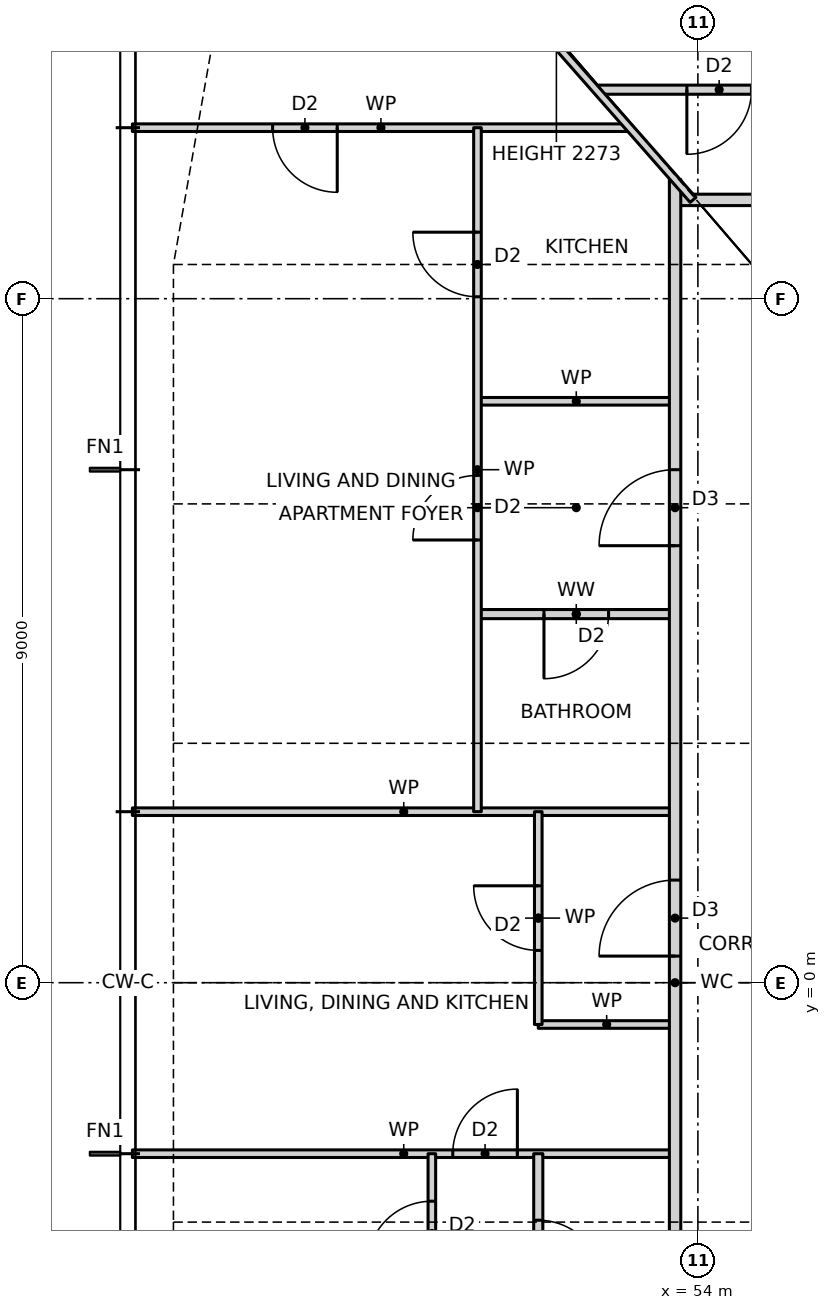
"""IFC4 building model, lengths in metres.
Left out: names, types, materials, properties, quantities, classifications, styles, units other than length and angle.
Written with IfcOpenShell. Run it as: python <this file> out.ifc"""

import sys

from ifc_helpers import new_model, si_unit, direction, frame, frame_2d, origin, place, context, subcontext, project, spatial, rectangle, extrude, element, fill, save


model = new_model("IFC4")
c1 = context("Model", 3, precision=1e-05, world=origin(), true_north=direction((0.0, 1.0)))
c2 = subcontext(c1, "Body", "Model", "MODEL_VIEW")
j1 = project(units=[si_unit("LENGTHUNIT", "METRE"), si_unit("PLANEANGLEUNIT", "RADIAN")], contexts=[c1])
p1 = place(None, origin())
s1 = spatial("IfcSite", under=j1, at=p1, CompositionType="ELEMENT")
p2 = place(p1, origin())
s2 = spatial("IfcBuilding", under=s1, at=p2, CompositionType="ELEMENT")
p3 = place(p2, frame((0.0, 0.0, 71.0)))
s3 = spatial("IfcBuildingStorey", under=s2, at=p3, CompositionType="ELEMENT", Elevation=71.0)
p4 = place(p3, frame((46.56, -2.25, 0.0), z_axis=(0.0, 0.0, 1.0), x_axis=(1.0, 0.0, 0.0)))
e1 = element("IfcWall", 1, at=p4, inside=s3, PredefinedType="PARTITIONING", context=c2, shape_type="SweptSolid", body=[
    extrude(rectangle(XDim=7.14, YDim=0.1, at=frame_2d((3.57, 0.0))), origin(), (0.0, 0.0, 1.0), 3.2),
])
p5 = place(p4, frame((4.215, 0.0, 0.0)))
e2 = element("IfcOpeningElement", 2, at=p5, cuts=e1, PredefinedType="OPENING", context=c2, shape_type="SweptSolid", body=[
    extrude(rectangle(XDim=0.85, YDim=2.1, at=frame_2d((0.425, 1.05))), frame((0.0, 0.06, 0.0), z_axis=(0.0, -1.0, 0.0), x_axis=(1.0, 0.0, 0.0)), (0.0, 0.0, 1.0), 0.12),
])
p6 = place(p3, frame((51.9, -0.55, 0.0), z_axis=(0.0, 0.0, 1.0), x_axis=(1.0, 0.0, 0.0)))
e3 = element("IfcWall", 3, at=p6, inside=s3, PredefinedType="PARTITIONING", context=c2, shape_type="SweptSolid", body=[
    extrude(rectangle(XDim=1.8, YDim=0.1, at=frame_2d((0.9, 0.0))), origin(), (0.0, 0.0, 1.0), 3.2),
])
p7 = place(p3, frame((46.56, 2.25, 0.0), z_axis=(0.0, 0.0, 1.0), x_axis=(1.0, 0.0, 0.0)))
e4 = element("IfcWall", 4, at=p7, inside=s3, PredefinedType="PARTITIONING", context=c2, shape_type="SweptSolid", body=[
    extrude(rectangle(XDim=7.14, YDim=0.1, at=frame_2d((3.57, 0.0))), origin(), (0.0, 0.0, 1.0), 3.2),
])
p8 = place(p3, frame((51.1, 4.85, 0.0), z_axis=(0.0, 0.0, 1.0), x_axis=(1.0, 0.0, 0.0)))
e5 = element("IfcWall", 5, at=p8, inside=s3, PredefinedType="PARTITIONING", context=c2, shape_type="SweptSolid", body=[
    extrude(rectangle(XDim=2.6, YDim=0.12, at=frame_2d((1.3, 0.0))), origin(), (0.0, 0.0, 1.0), 3.2),
])
p9 = place(p8, frame((0.875, 0.0, 0.0)))
e6 = element("IfcOpeningElement", 6, at=p9, cuts=e5, PredefinedType="OPENING", context=c2, shape_type="SweptSolid", body=[
    extrude(rectangle(XDim=0.85, YDim=2.1, at=frame_2d((0.425, 1.05))), frame((0.0, 0.07, 0.0), z_axis=(0.0, -1.0, 0.0), x_axis=(1.0, 0.0, 0.0)), (0.0, 0.0, 1.0), 0.14),
])
p10 = place(p3, frame((51.1, 7.65, 0.0), z_axis=(0.0, 0.0, 1.0), x_axis=(1.0, 0.0, 0.0)))
e7 = element("IfcWall", 7, at=p10, inside=s3, PredefinedType="PARTITIONING", context=c2, shape_type="SweptSolid", body=[
    extrude(rectangle(XDim=2.6, YDim=0.1, at=frame_2d((1.3, 0.0))), origin(), (0.0, 0.0, 1.0), 3.2),
])
p11 = place(p3, frame((53.7, 10.3, 0.0), z_axis=(0.0, 0.0, 1.0), x_axis=(1.0, 0.0, 0.0)))
e8 = element("IfcWall", 8, at=p11, inside=s3, PredefinedType="PARTITIONING", context=c2, shape_type="SweptSolid", body=[
    extrude(rectangle(XDim=18.6, YDim=0.15, at=frame_2d((9.3, 0.0))), origin(), (0.0, 0.0, 1.0), 3.2),
])
p12 = place(p11, frame((12.8, 0.0, 0.0)))
e9 = element("IfcOpeningElement", 9, at=p12, cuts=e8, PredefinedType="OPENING", context=c2, shape_type="SweptSolid", body=[
    extrude(rectangle(XDim=1.0, YDim=2.1, at=frame_2d((0.5, 1.05))), frame((0.0, 0.085, 0.0), z_axis=(0.0, -1.0, 0.0), x_axis=(1.0, 0.0, 0.0)), (0.0, 0.0, 1.0), 0.17),
])
p13 = place(p11, frame((7.4, 0.0, 0.0)))
e10 = element("IfcOpeningElement", 10, at=p13, cuts=e8, PredefinedType="OPENING", context=c2, shape_type="SweptSolid", body=[
    extrude(rectangle(XDim=1.0, YDim=2.1, at=frame_2d((0.5, 1.05))), frame((0.0, 0.085, 0.0), z_axis=(0.0, -1.0, 0.0), x_axis=(1.0, 0.0, 0.0)), (0.0, 0.0, 1.0), 0.17),
])
p14 = place(p3, frame((46.56, 11.25, 0.0), z_axis=(0.0, 0.0, 1.0), x_axis=(1.0, 0.0, 0.0)))
e11 = element("IfcWall", 11, at=p14, inside=s3, PredefinedType="PARTITIONING", context=c2, shape_type="SweptSolid", body=[
    extrude(rectangle(XDim=6.54, YDim=0.1, at=frame_2d((3.27, 0.0))), origin(), (0.0, 0.0, 1.0), 3.2),
])
p15 = place(p14, frame((1.845, 0.0, 0.0)))
e12 = element("IfcOpeningElement", 12, at=p15, cuts=e11, PredefinedType="OPENING", context=c2, shape_type="SweptSolid", body=[
    extrude(rectangle(XDim=0.85, YDim=2.1, at=frame_2d((0.425, 1.05))), frame((0.0, 0.06, 0.0), z_axis=(0.0, -1.0, 0.0), x_axis=(1.0, 0.0, 0.0)), (0.0, 0.0, 1.0), 0.12),
])
p16 = place(p3, frame((52.66, 11.75, 0.0), z_axis=(0.0, 0.0, 1.0), x_axis=(1.0, 0.0, 0.0)))
e13 = element("IfcWall", 13, at=p16, inside=s3, PredefinedType="PARTITIONING", context=c2, shape_type="SweptSolid", body=[
    extrude(rectangle(XDim=5.84, YDim=0.12, at=frame_2d((2.92, 0.0))), origin(), (0.0, 0.0, 1.0), 3.2),
])
p17 = place(p16, frame((4.115, 0.0, 0.0)))
e14 = element("IfcOpeningElement", 14, at=p17, cuts=e13, PredefinedType="OPENING", context=c2, shape_type="SweptSolid", body=[
    extrude(rectangle(XDim=0.85, YDim=2.1, at=frame_2d((0.425, 1.05))), frame((0.0, 0.07, 0.0), z_axis=(0.0, -1.0, 0.0), x_axis=(1.0, 0.0, 0.0)), (0.0, 0.0, 1.0), 0.14),
])
p18 = place(p16, frame((1.195, 0.0, 0.0)))
e15 = element("IfcOpeningElement", 15, at=p18, cuts=e13, PredefinedType="OPENING", context=c2, shape_type="SweptSolid", body=[
    extrude(rectangle(XDim=0.85, YDim=2.1, at=frame_2d((0.425, 1.05))), frame((0.0, 0.07, 0.0), z_axis=(0.0, -1.0, 0.0), x_axis=(1.0, 0.0, 0.0)), (0.0, 0.0, 1.0), 0.14),
])
p19 = place(p3, frame((53.7, -10.568, 0.0), z_axis=(0.0, 0.0, 1.0), x_axis=(0.0, 1.0, 0.0)))
e16 = element("IfcWall", 16, at=p19, inside=s3, PredefinedType="PARTITIONING", context=c2, shape_type="SweptSolid", body=[
    extrude(rectangle(XDim=21.136, YDim=0.15, at=frame_2d((10.568, 0.0))), origin(), (0.0, 0.0, 1.0), 3.2),
])
p20 = place(p19, frame((16.318, 0.0, 0.0)))
e17 = element("IfcOpeningElement", 17, at=p20, cuts=e16, PredefinedType="OPENING", context=c2, shape_type="SweptSolid", body=[
    extrude(rectangle(XDim=1.0, YDim=2.1, at=frame_2d((0.5, 1.05))), frame((0.0, 0.085, 0.0), z_axis=(0.0, -1.0, 0.0), x_axis=(1.0, 0.0, 0.0)), (0.0, 0.0, 1.0), 0.17),
])
p21 = place(p19, frame((10.918, 0.0, 0.0)))
e18 = element("IfcOpeningElement", 18, at=p21, cuts=e16, PredefinedType="OPENING", context=c2, shape_type="SweptSolid", body=[
    extrude(rectangle(XDim=1.0, YDim=2.1, at=frame_2d((0.5, 1.05))), frame((0.0, 0.085, 0.0), z_axis=(0.0, -1.0, 0.0), x_axis=(1.0, 0.0, 0.0)), (0.0, 0.0, 1.0), 0.17),
])
p22 = place(p3, frame((51.9, -12.614, 0.0), z_axis=(0.0, 0.0, 1.0), x_axis=(0.0, 1.0, 0.0)))
e19 = element("IfcWall", 19, at=p22, inside=s3, PredefinedType="PARTITIONING", context=c2, shape_type="SweptSolid", body=[
    extrude(rectangle(XDim=10.364, YDim=0.12, at=frame_2d((5.182, 0.0))), origin(), (0.0, 0.0, 1.0), 3.2),
])
p23 = place(p22, frame((8.639, 0.0, 0.0)))
e20 = element("IfcOpeningElement", 20, at=p23, cuts=e19, PredefinedType="OPENING", context=c2, shape_type="SweptSolid", body=[
    extrude(rectangle(XDim=0.85, YDim=2.1, at=frame_2d((0.425, 1.05))), frame((0.0, 0.07, 0.0), z_axis=(0.0, -1.0, 0.0), x_axis=(1.0, 0.0, 0.0)), (0.0, 0.0, 1.0), 0.14),
])
p24 = place(p22, frame((5.139, 0.0, 0.0)))
e21 = element("IfcOpeningElement", 21, at=p24, cuts=e19, PredefinedType="OPENING", context=c2, shape_type="SweptSolid", body=[
    extrude(rectangle(XDim=0.85, YDim=2.1, at=frame_2d((0.425, 1.05))), frame((0.0, 0.07, 0.0), z_axis=(0.0, -1.0, 0.0), x_axis=(1.0, 0.0, 0.0)), (0.0, 0.0, 1.0), 0.14),
])
p25 = place(p22, frame((1.257, 0.0, 0.0)))
e22 = element("IfcOpeningElement", 22, at=p25, cuts=e19, PredefinedType="OPENING", context=c2, shape_type="SweptSolid", body=[
    extrude(rectangle(XDim=0.85, YDim=2.1, at=frame_2d((0.425, 1.05))), frame((0.0, 0.07, 0.0), z_axis=(0.0, -1.0, 0.0), x_axis=(1.0, 0.0, 0.0)), (0.0, 0.0, 1.0), 0.14),
])
p26 = place(p3, frame((51.9, -0.55, 0.0), z_axis=(0.0, 0.0, 1.0), x_axis=(0.0, 1.0, 0.0)))
e23 = element("IfcWall", 23, at=p26, inside=s3, PredefinedType="PARTITIONING", context=c2, shape_type="SweptSolid", body=[
    extrude(rectangle(XDim=2.8, YDim=0.1, at=frame_2d((1.4, 0.0))), origin(), (0.0, 0.0, 1.0), 3.2),
])
p27 = place(p26, frame((0.975, 0.0, 0.0)))
e24 = element("IfcOpeningElement", 24, at=p27, cuts=e23, PredefinedType="OPENING", context=c2, shape_type="SweptSolid", body=[
    extrude(rectangle(XDim=0.85, YDim=2.1, at=frame_2d((0.425, 1.05))), frame((0.0, 0.06, 0.0), z_axis=(0.0, -1.0, 0.0), x_axis=(1.0, 0.0, 0.0)), (0.0, 0.0, 1.0), 0.12),
])
p28 = place(p3, frame((51.1, 2.25, 0.0), z_axis=(0.0, 0.0, 1.0), x_axis=(0.0, 1.0, 0.0)))
e25 = element("IfcWall", 25, at=p28, inside=s3, PredefinedType="PARTITIONING", context=c2, shape_type="SweptSolid", body=[
    extrude(rectangle(XDim=9.0, YDim=0.1, at=frame_2d((4.5, 0.0))), origin(), (0.0, 0.0, 1.0), 3.2),
])
p29 = place(p28, frame((6.775, 0.0, 0.0)))
e26 = element("IfcOpeningElement", 26, at=p29, cuts=e25, PredefinedType="OPENING", context=c2, shape_type="SweptSolid", body=[
    extrude(rectangle(XDim=0.85, YDim=2.1, at=frame_2d((0.425, 1.05))), frame((0.0, 0.06, 0.0), z_axis=(0.0, -1.0, 0.0), x_axis=(1.0, 0.0, 0.0)), (0.0, 0.0, 1.0), 0.12),
])
p30 = place(p28, frame((3.575, 0.0, 0.0)))
e27 = element("IfcOpeningElement", 27, at=p30, cuts=e25, PredefinedType="OPENING", context=c2, shape_type="SweptSolid", body=[
    extrude(rectangle(XDim=0.85, YDim=2.1, at=frame_2d((0.425, 1.05))), frame((0.0, 0.06, 0.0), z_axis=(0.0, -1.0, 0.0), x_axis=(1.0, 0.0, 0.0)), (0.0, 0.0, 1.0), 0.12),
])
p31 = place(p3, frame((50.5, -13.45, 0.0), z_axis=(0.0, 0.0, 1.0), x_axis=(0.0, 1.0, 0.0)))
e28 = element("IfcWall", 28, at=p31, inside=s3, PredefinedType="PARTITIONING", context=c2, shape_type="SweptSolid", body=[
    extrude(rectangle(XDim=11.2, YDim=0.1, at=frame_2d((5.6, 0.0))), origin(), (0.0, 0.0, 1.0), 3.2),
])
p32 = place(p31, frame((9.725, 0.0, 0.0)))
e29 = element("IfcOpeningElement", 29, at=p32, cuts=e28, PredefinedType="OPENING", context=c2, shape_type="SweptSolid", body=[
    extrude(rectangle(XDim=0.85, YDim=2.1, at=frame_2d((0.425, 1.05))), frame((0.0, 0.06, 0.0), z_axis=(0.0, -1.0, 0.0), x_axis=(1.0, 0.0, 0.0)), (0.0, 0.0, 1.0), 0.12),
])
p33 = place(p31, frame((4.025, 0.0, 0.0)))
e30 = element("IfcOpeningElement", 30, at=p33, cuts=e28, PredefinedType="OPENING", context=c2, shape_type="SweptSolid", body=[
    extrude(rectangle(XDim=0.85, YDim=2.1, at=frame_2d((0.425, 1.05))), frame((0.0, 0.06, 0.0), z_axis=(0.0, -1.0, 0.0), x_axis=(1.0, 0.0, 0.0)), (0.0, 0.0, 1.0), 0.12),
])
p34 = place(p31, frame((0.675, 0.0, 0.0)))
e31 = element("IfcOpeningElement", 31, at=p34, cuts=e28, PredefinedType="OPENING", context=c2, shape_type="SweptSolid", body=[
    extrude(rectangle(XDim=0.85, YDim=2.1, at=frame_2d((0.425, 1.05))), frame((0.0, 0.06, 0.0), z_axis=(0.0, -1.0, 0.0), x_axis=(1.0, 0.0, 0.0)), (0.0, 0.0, 1.0), 0.12),
])
p35 = place(p3, frame((53.936, 10.3, 0.0), z_axis=(0.0, 0.0, 1.0), x_axis=(-0.660638210404, 0.750704439146, 0.0)))
e32 = element("IfcWall", 32, at=p35, inside=s3, PredefinedType="PARTITIONING", context=c2, shape_type="SweptSolid", body=[
    extrude(rectangle(XDim=9.07, YDim=0.1, at=frame_2d((4.535, 0.0))), origin(), (0.0, 0.0, 1.0), 2.273),
])
p36 = place(p18, frame((0.85, 0.0, 0.0), z_axis=(0.0, 0.0, 1.0), x_axis=(-1.0, 0.0, 0.0)))
e33 = element("IfcDoor", 33, at=p36, inside=s3, OperationType="SINGLE_SWING_RIGHT", PredefinedType="DOOR", context=c2, shape_type="SweptSolid", body=[
    extrude(rectangle(XDim=0.85, YDim=2.1, at=frame_2d((0.425, 1.05))), frame((0.0, 0.025, 0.0), z_axis=(0.0, -1.0, 0.0), x_axis=(1.0, 0.0, 0.0)), (0.0, 0.0, 1.0), 0.05),
])
fill(e15, e33)
p37 = place(p29, origin())
e34 = element("IfcDoor", 34, at=p37, inside=s3, OperationType="SINGLE_SWING_RIGHT", PredefinedType="DOOR", context=c2, shape_type="SweptSolid", body=[
    extrude(rectangle(XDim=0.85, YDim=2.1, at=frame_2d((0.425, 1.05))), frame((0.0, 0.025, 0.0), z_axis=(0.0, -1.0, 0.0), x_axis=(1.0, 0.0, 0.0)), (0.0, 0.0, 1.0), 0.05),
])
fill(e26, e34)
p38 = place(p20, origin())
e35 = element("IfcDoor", 35, at=p38, inside=s3, OperationType="SINGLE_SWING_LEFT", PredefinedType="DOOR", context=c2, shape_type="SweptSolid", body=[
    extrude(rectangle(XDim=1.0, YDim=2.1, at=frame_2d((0.5, 1.05))), frame((0.0, 0.025, 0.0), z_axis=(0.0, -1.0, 0.0), x_axis=(1.0, 0.0, 0.0)), (0.0, 0.0, 1.0), 0.05),
])
fill(e17, e35)
p39 = place(p30, origin())
e36 = element("IfcDoor", 36, at=p39, inside=s3, OperationType="SINGLE_SWING_LEFT", PredefinedType="DOOR", context=c2, shape_type="SweptSolid", body=[
    extrude(rectangle(XDim=0.85, YDim=2.1, at=frame_2d((0.425, 1.05))), frame((0.0, 0.025, 0.0), z_axis=(0.0, -1.0, 0.0), x_axis=(1.0, 0.0, 0.0)), (0.0, 0.0, 1.0), 0.05),
])
fill(e27, e36)
p40 = place(p9, frame((0.85, 0.0, 0.0), z_axis=(0.0, 0.0, 1.0), x_axis=(-1.0, 0.0, 0.0)))
e37 = element("IfcDoor", 37, at=p40, inside=s3, OperationType="SINGLE_SWING_RIGHT", PredefinedType="DOOR", context=c2, shape_type="SweptSolid", body=[
    extrude(rectangle(XDim=0.85, YDim=2.1, at=frame_2d((0.425, 1.05))), frame((0.0, 0.025, 0.0), z_axis=(0.0, -1.0, 0.0), x_axis=(1.0, 0.0, 0.0)), (0.0, 0.0, 1.0), 0.05),
])
fill(e6, e37)
p41 = place(p15, frame((0.85, 0.0, 0.0), z_axis=(0.0, 0.0, 1.0), x_axis=(-1.0, 0.0, 0.0)))
e38 = element("IfcDoor", 38, at=p41, inside=s3, OperationType="SINGLE_SWING_LEFT", PredefinedType="DOOR", context=c2, shape_type="SweptSolid", body=[
    extrude(rectangle(XDim=0.85, YDim=2.1, at=frame_2d((0.425, 1.05))), frame((0.0, 0.025, 0.0), z_axis=(0.0, -1.0, 0.0), x_axis=(1.0, 0.0, 0.0)), (0.0, 0.0, 1.0), 0.05),
])
fill(e12, e38)
p42 = place(p21, origin())
e39 = element("IfcDoor", 39, at=p42, inside=s3, OperationType="SINGLE_SWING_LEFT", PredefinedType="DOOR", context=c2, shape_type="SweptSolid", body=[
    extrude(rectangle(XDim=1.0, YDim=2.1, at=frame_2d((0.5, 1.05))), frame((0.0, 0.025, 0.0), z_axis=(0.0, -1.0, 0.0), x_axis=(1.0, 0.0, 0.0)), (0.0, 0.0, 1.0), 0.05),
])
fill(e18, e39)
p43 = place(p27, origin())
e40 = element("IfcDoor", 40, at=p43, inside=s3, OperationType="SINGLE_SWING_RIGHT", PredefinedType="DOOR", context=c2, shape_type="SweptSolid", body=[
    extrude(rectangle(XDim=0.85, YDim=2.1, at=frame_2d((0.425, 1.05))), frame((0.0, 0.025, 0.0), z_axis=(0.0, -1.0, 0.0), x_axis=(1.0, 0.0, 0.0)), (0.0, 0.0, 1.0), 0.05),
])
fill(e24, e40)
p44 = place(p5, origin())
e41 = element("IfcDoor", 41, at=p44, inside=s3, OperationType="SINGLE_SWING_RIGHT", PredefinedType="DOOR", context=c2, shape_type="SweptSolid", body=[
    extrude(rectangle(XDim=0.85, YDim=2.1, at=frame_2d((0.425, 1.05))), frame((0.0, 0.025, 0.0), z_axis=(0.0, -1.0, 0.0), x_axis=(1.0, 0.0, 0.0)), (0.0, 0.0, 1.0), 0.05),
])
fill(e2, e41)
p45 = place(p32, origin())
e42 = element("IfcDoor", 42, at=p45, inside=s3, OperationType="SINGLE_SWING_LEFT", PredefinedType="DOOR", context=c2, shape_type="SweptSolid", body=[
    extrude(rectangle(XDim=0.85, YDim=2.1, at=frame_2d((0.425, 1.05))), frame((0.0, 0.025, 0.0), z_axis=(0.0, -1.0, 0.0), x_axis=(1.0, 0.0, 0.0)), (0.0, 0.0, 1.0), 0.05),
])
fill(e29, e42)
p46 = place(p23, frame((0.85, 0.0, 0.0), z_axis=(0.0, 0.0, 1.0), x_axis=(-1.0, 0.0, 0.0)))
e43 = element("IfcDoor", 43, at=p46, inside=s3, OperationType="SINGLE_SWING_RIGHT", PredefinedType="DOOR", context=c2, shape_type="SweptSolid", body=[
    extrude(rectangle(XDim=0.85, YDim=2.1, at=frame_2d((0.425, 1.05))), frame((0.0, 0.025, 0.0), z_axis=(0.0, -1.0, 0.0), x_axis=(1.0, 0.0, 0.0)), (0.0, 0.0, 1.0), 0.05),
])
fill(e20, e43)
save(model, sys.argv[1])
